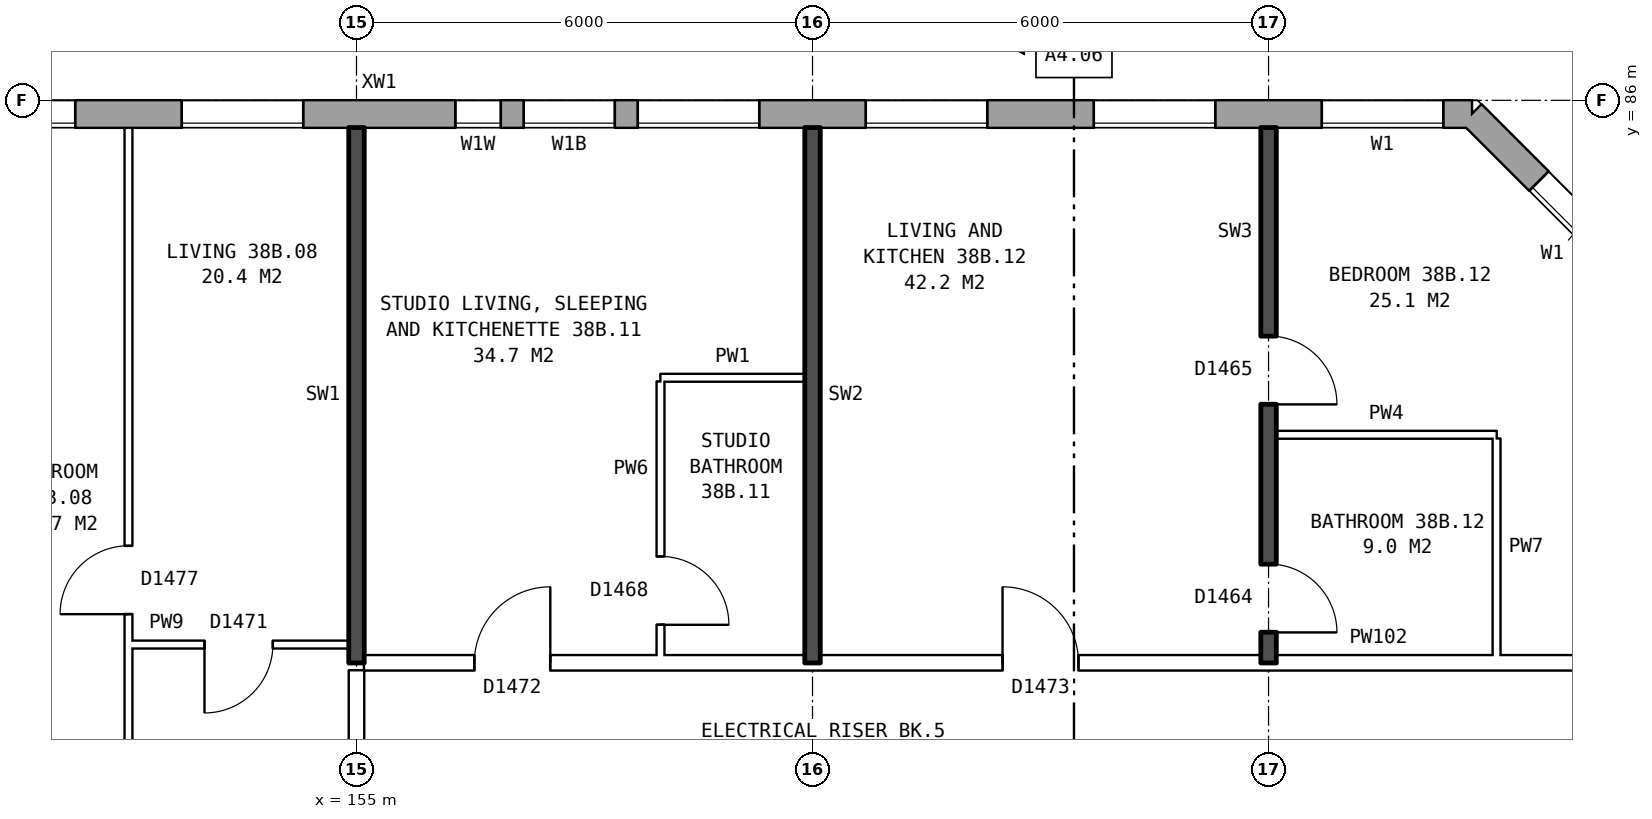
"""IFC4 building model, lengths in metres.
Left out: names, types, materials, properties, quantities, classifications, styles, units other than length and angle.
Written with IfcOpenShell. Run it as: python <this file> out.ifc"""

import sys

from ifc_helpers import new_model, si_unit, direction, frame, frame_2d, origin, place, context, subcontext, project, spatial, rectangle, extrude, element, fill, save


model = new_model("IFC4")
c1 = context("Model", 3, precision=1e-05, world=origin(), true_north=direction((0.0, 1.0)))
c2 = subcontext(c1, "Body", "Model", "MODEL_VIEW")
j1 = project(units=[si_unit("LENGTHUNIT", "METRE"), si_unit("PLANEANGLEUNIT", "RADIAN")], contexts=[c1])
p1 = place(None, origin())
s1 = spatial("IfcSite", under=j1, at=p1, CompositionType="ELEMENT")
p2 = place(p1, origin())
s2 = spatial("IfcBuilding", under=s1, at=p2, CompositionType="ELEMENT")
p3 = place(p2, frame((0.0, 0.0, 136.1)))
s3 = spatial("IfcBuildingStorey", under=s2, at=p3, CompositionType="ELEMENT", Elevation=136.1)
p4 = place(p3, frame((172.57, 82.925, 0.0), z_axis=(0.0, 0.0, 1.0), x_axis=(-0.707106781187, 0.707106781187, 0.0)))
e1 = element("IfcWall", 1, at=p4, inside=s3, PredefinedType="STANDARD", context=c2, shape_type="SweptSolid", body=[
    extrude(rectangle(XDim=4.094, YDim=0.36, at=frame_2d((2.047, 0.0))), origin(), (0.0, 0.0, 1.0), 2.85),
])
p5 = place(p4, frame((1.247, 0.0, 0.8)))
e2 = element("IfcOpeningElement", 2, at=p5, cuts=e1, PredefinedType="OPENING", context=c2, shape_type="SweptSolid", body=[
    extrude(rectangle(XDim=1.6, YDim=1.8, at=frame_2d((0.8, 0.9))), frame((0.0, 0.19, 0.0), z_axis=(0.0, -1.0, 0.0), x_axis=(1.0, 0.0, 0.0)), (0.0, 0.0, 1.0), 0.38),
])
p6 = place(p3, frame((169.675, 85.82, 0.0), z_axis=(0.0, 0.0, 1.0), x_axis=(-1.0, 0.0, 0.0)))
e3 = element("IfcWall", 3, at=p6, inside=s3, PredefinedType="STANDARD", context=c2, shape_type="SweptSolid", body=[
    extrude(rectangle(XDim=35.601, YDim=0.36, at=frame_2d((17.8, 0.0))), origin(), (0.0, 0.0, 1.0), 2.85),
])
p7 = place(p6, frame((0.375, 0.0, 0.8)))
e4 = element("IfcOpeningElement", 4, at=p7, cuts=e3, PredefinedType="OPENING", context=c2, shape_type="SweptSolid", body=[
    extrude(rectangle(XDim=1.6, YDim=1.8, at=frame_2d((0.8, 0.9))), frame((0.0, 0.19, 0.0), z_axis=(0.0, -1.0, 0.0), x_axis=(1.0, 0.0, 0.0)), (0.0, 0.0, 1.0), 0.38),
])
p8 = place(p6, frame((3.375, 0.0, 0.8)))
e5 = element("IfcOpeningElement", 5, at=p8, cuts=e3, PredefinedType="OPENING", context=c2, shape_type="SweptSolid", body=[
    extrude(rectangle(XDim=1.6, YDim=1.8, at=frame_2d((0.8, 0.9))), frame((0.0, 0.19, 0.0), z_axis=(0.0, -1.0, 0.0), x_axis=(1.0, 0.0, 0.0)), (0.0, 0.0, 1.0), 0.38),
])
p9 = place(p6, frame((6.375, 0.0, 0.8)))
e6 = element("IfcOpeningElement", 6, at=p9, cuts=e3, PredefinedType="OPENING", context=c2, shape_type="SweptSolid", body=[
    extrude(rectangle(XDim=1.6, YDim=1.8, at=frame_2d((0.8, 0.9))), frame((0.0, 0.19, 0.0), z_axis=(0.0, -1.0, 0.0), x_axis=(1.0, 0.0, 0.0)), (0.0, 0.0, 1.0), 0.38),
])
p10 = place(p6, frame((9.375, 0.0, 0.8)))
e7 = element("IfcOpeningElement", 7, at=p10, cuts=e3, PredefinedType="OPENING", context=c2, shape_type="SweptSolid", body=[
    extrude(rectangle(XDim=1.6, YDim=1.8, at=frame_2d((0.8, 0.9))), frame((0.0, 0.19, 0.0), z_axis=(0.0, -1.0, 0.0), x_axis=(1.0, 0.0, 0.0)), (0.0, 0.0, 1.0), 0.38),
])
p11 = place(p6, frame((11.275, 0.0, 0.8)))
e8 = element("IfcOpeningElement", 8, at=p11, cuts=e3, PredefinedType="OPENING", context=c2, shape_type="SweptSolid", body=[
    extrude(rectangle(XDim=1.2, YDim=1.8, at=frame_2d((0.6, 0.9))), frame((0.0, 0.19, 0.0), z_axis=(0.0, -1.0, 0.0), x_axis=(1.0, 0.0, 0.0)), (0.0, 0.0, 1.0), 0.38),
])
p12 = place(p6, frame((15.375, 0.0, 0.8)))
e9 = element("IfcOpeningElement", 9, at=p12, cuts=e3, PredefinedType="OPENING", context=c2, shape_type="SweptSolid", body=[
    extrude(rectangle(XDim=1.6, YDim=1.8, at=frame_2d((0.8, 0.9))), frame((0.0, 0.19, 0.0), z_axis=(0.0, -1.0, 0.0), x_axis=(1.0, 0.0, 0.0)), (0.0, 0.0, 1.0), 0.38),
])
p13 = place(p6, frame((18.375, 0.0, 0.8)))
e10 = element("IfcOpeningElement", 10, at=p13, cuts=e3, PredefinedType="OPENING", context=c2, shape_type="SweptSolid", body=[
    extrude(rectangle(XDim=1.6, YDim=1.8, at=frame_2d((0.8, 0.9))), frame((0.0, 0.19, 0.0), z_axis=(0.0, -1.0, 0.0), x_axis=(1.0, 0.0, 0.0)), (0.0, 0.0, 1.0), 0.38),
])
p14 = place(p6, frame((20.875, 0.0, 0.35)))
e11 = element("IfcOpeningElement", 11, at=p14, cuts=e3, PredefinedType="OPENING", context=c2, shape_type="SweptSolid", body=[
    extrude(rectangle(XDim=0.6, YDim=0.9, at=frame_2d((0.3, 0.45))), frame((0.0, 0.19, 0.0), z_axis=(0.0, -1.0, 0.0), x_axis=(1.0, 0.0, 0.0)), (0.0, 0.0, 1.0), 0.38),
])
p15 = place(p6, frame((24.375, 0.0, 0.8)))
e12 = element("IfcOpeningElement", 12, at=p15, cuts=e3, PredefinedType="OPENING", context=c2, shape_type="SweptSolid", body=[
    extrude(rectangle(XDim=1.6, YDim=1.8, at=frame_2d((0.8, 0.9))), frame((0.0, 0.19, 0.0), z_axis=(0.0, -1.0, 0.0), x_axis=(1.0, 0.0, 0.0)), (0.0, 0.0, 1.0), 0.38),
])
p16 = place(p6, frame((27.375, 0.0, 0.8)))
e13 = element("IfcOpeningElement", 13, at=p16, cuts=e3, PredefinedType="OPENING", context=c2, shape_type="SweptSolid", body=[
    extrude(rectangle(XDim=1.6, YDim=1.8, at=frame_2d((0.8, 0.9))), frame((0.0, 0.19, 0.0), z_axis=(0.0, -1.0, 0.0), x_axis=(1.0, 0.0, 0.0)), (0.0, 0.0, 1.0), 0.38),
])
p17 = place(p6, frame((30.375, 0.0, 0.8)))
e14 = element("IfcOpeningElement", 14, at=p17, cuts=e3, PredefinedType="OPENING", context=c2, shape_type="SweptSolid", body=[
    extrude(rectangle(XDim=1.6, YDim=1.8, at=frame_2d((0.8, 0.9))), frame((0.0, 0.19, 0.0), z_axis=(0.0, -1.0, 0.0), x_axis=(1.0, 0.0, 0.0)), (0.0, 0.0, 1.0), 0.38),
])
p18 = place(p6, frame((33.375, 0.0, 0.8)))
e15 = element("IfcOpeningElement", 15, at=p18, cuts=e3, PredefinedType="OPENING", context=c2, shape_type="SweptSolid", body=[
    extrude(rectangle(XDim=1.6, YDim=1.8, at=frame_2d((0.8, 0.9))), frame((0.0, 0.19, 0.0), z_axis=(0.0, -1.0, 0.0), x_axis=(1.0, 0.0, 0.0)), (0.0, 0.0, 1.0), 0.38),
])
p19 = place(p6, frame((12.775, 0.0, 1.6)))
e16 = element("IfcOpeningElement", 16, at=p19, cuts=e3, PredefinedType="OPENING", context=c2, shape_type="SweptSolid", body=[
    extrude(rectangle(XDim=0.6, YDim=0.9, at=frame_2d((0.3, 0.45))), frame((0.0, 0.19, 0.0), z_axis=(0.0, -1.0, 0.0), x_axis=(1.0, 0.0, 0.0)), (0.0, 0.0, 1.0), 0.38),
])
p20 = place(p6, frame((22.425, 0.0, 1.35)))
e17 = element("IfcOpeningElement", 17, at=p20, cuts=e3, PredefinedType="OPENING", context=c2, shape_type="SweptSolid", body=[
    extrude(rectangle(XDim=1.0, YDim=1.2, at=frame_2d((0.5, 0.6))), frame((0.0, 0.19, 0.0), z_axis=(0.0, -1.0, 0.0), x_axis=(1.0, 0.0, 0.0)), (0.0, 0.0, 1.0), 0.38),
])
p21 = place(p3, frame((155.1, 78.6, 0.0), z_axis=(0.0, 0.0, 1.0), x_axis=(1.0, 0.0, 0.0)))
e18 = element("IfcWall", 18, at=p21, inside=s3, PredefinedType="PARTITIONING", context=c2, shape_type="SweptSolid", body=[
    extrude(rectangle(XDim=17.29, YDim=0.2, at=frame_2d((8.645, 0.0))), origin(), (0.0, 0.0, 1.0), 2.85),
])
p22 = place(p21, frame((1.45, 0.0, 0.0)))
e19 = element("IfcOpeningElement", 19, at=p22, cuts=e18, PredefinedType="OPENING", context=c2, shape_type="SweptSolid", body=[
    extrude(rectangle(XDim=1.0, YDim=2.1, at=frame_2d((0.5, 1.05))), frame((0.0, 0.11, 0.0), z_axis=(0.0, -1.0, 0.0), x_axis=(1.0, 0.0, 0.0)), (0.0, 0.0, 1.0), 0.22),
])
p23 = place(p21, frame((8.4, 0.0, 0.0)))
e20 = element("IfcOpeningElement", 20, at=p23, cuts=e18, PredefinedType="OPENING", context=c2, shape_type="SweptSolid", body=[
    extrude(rectangle(XDim=1.0, YDim=2.1, at=frame_2d((0.5, 1.05))), frame((0.0, 0.11, 0.0), z_axis=(0.0, -1.0, 0.0), x_axis=(1.0, 0.0, 0.0)), (0.0, 0.0, 1.0), 0.22),
])
p24 = place(p3, frame((152.0, 78.84, 0.0), z_axis=(0.0, 0.0, 1.0), x_axis=(1.0, 0.0, 0.0)))
e21 = element("IfcWall", 21, at=p24, inside=s3, PredefinedType="PARTITIONING", context=c2, shape_type="SweptSolid", body=[
    extrude(rectangle(XDim=2.9, YDim=0.1, at=frame_2d((1.45, 0.0))), origin(), (0.0, 0.0, 1.0), 2.85),
])
p25 = place(p24, frame((1.0, 0.0, 0.0)))
e22 = element("IfcOpeningElement", 22, at=p25, cuts=e21, PredefinedType="OPENING", context=c2, shape_type="SweptSolid", body=[
    extrude(rectangle(XDim=0.9, YDim=2.1, at=frame_2d((0.45, 1.05))), frame((0.0, 0.06, 0.0), z_axis=(0.0, -1.0, 0.0), x_axis=(1.0, 0.0, 0.0)), (0.0, 0.0, 1.0), 0.12),
])
p26 = place(p3, frame((167.1, 81.6, 0.0), z_axis=(0.0, 0.0, 1.0), x_axis=(1.0, 0.0, 0.0)))
e23 = element("IfcWall", 23, at=p26, inside=s3, PredefinedType="PARTITIONING", context=c2, shape_type="SweptSolid", body=[
    extrude(rectangle(XDim=2.9, YDim=0.1, at=frame_2d((1.45, 0.0))), origin(), (0.0, 0.0, 1.0), 2.85),
])
p27 = place(p3, frame((159.0, 82.35, 0.0), z_axis=(0.0, 0.0, 1.0), x_axis=(1.0, 0.0, 0.0)))
e24 = element("IfcWall", 24, at=p27, inside=s3, PredefinedType="PARTITIONING", context=c2, shape_type="SweptSolid", body=[
    extrude(rectangle(XDim=1.9, YDim=0.1, at=frame_2d((0.95, 0.0))), origin(), (0.0, 0.0, 1.0), 2.85),
])
p28 = place(p3, frame((152.0, 71.3, 0.0), z_axis=(0.0, 0.0, 1.0), x_axis=(0.0, 1.0, 0.0)))
e25 = element("IfcWall", 25, at=p28, inside=s3, PredefinedType="PARTITIONING", context=c2, shape_type="SweptSolid", body=[
    extrude(rectangle(XDim=14.34, YDim=0.1, at=frame_2d((7.17, 0.0))), origin(), (0.0, 0.0, 1.0), 2.85),
])
p29 = place(p28, frame((7.94, 0.0, 0.0)))
e26 = element("IfcOpeningElement", 26, at=p29, cuts=e25, PredefinedType="OPENING", context=c2, shape_type="SweptSolid", body=[
    extrude(rectangle(XDim=0.9, YDim=2.1, at=frame_2d((0.45, 1.05))), frame((0.0, 0.06, 0.0), z_axis=(0.0, -1.0, 0.0), x_axis=(1.0, 0.0, 0.0)), (0.0, 0.0, 1.0), 0.12),
])
p30 = place(p28, frame((0.4, 0.0, 0.0)))
e27 = element("IfcOpeningElement", 27, at=p30, cuts=e25, PredefinedType="OPENING", context=c2, shape_type="SweptSolid", body=[
    extrude(rectangle(XDim=0.9, YDim=2.1, at=frame_2d((0.45, 1.05))), frame((0.0, 0.06, 0.0), z_axis=(0.0, -1.0, 0.0), x_axis=(1.0, 0.0, 0.0)), (0.0, 0.0, 1.0), 0.12),
])
p31 = place(p3, frame((155.0, 76.3, 0.0), z_axis=(0.0, 0.0, 1.0), x_axis=(0.0, 1.0, 0.0)))
e28 = element("IfcWall", 28, at=p31, inside=s3, PredefinedType="PARTITIONING", context=c2, shape_type="SweptSolid", body=[
    extrude(rectangle(XDim=2.2, YDim=0.2, at=frame_2d((1.1, 0.0))), origin(), (0.0, 0.0, 1.0), 2.85),
])
p32 = place(p3, frame((155.0, 78.6, 0.0), z_axis=(0.0, 0.0, 1.0), x_axis=(0.0, 1.0, 0.0)))
e29 = element("IfcWall", 29, at=p32, inside=s3, PredefinedType="SOLIDWALL", context=c2, shape_type="SweptSolid", body=[
    extrude(rectangle(XDim=7.04, YDim=0.2, at=frame_2d((3.52, 0.0))), origin(), (0.0, 0.0, 1.0), 2.85),
])
p33 = place(p3, frame((159.0, 78.7, 0.0), z_axis=(0.0, 0.0, 1.0), x_axis=(0.0, 1.0, 0.0)))
e30 = element("IfcWall", 30, at=p33, inside=s3, PredefinedType="PARTITIONING", context=c2, shape_type="SweptSolid", body=[
    extrude(rectangle(XDim=3.6, YDim=0.1, at=frame_2d((1.8, 0.0))), origin(), (0.0, 0.0, 1.0), 2.85),
])
p34 = place(p33, frame((0.4, 0.0, 0.0)))
e31 = element("IfcOpeningElement", 31, at=p34, cuts=e30, PredefinedType="OPENING", context=c2, shape_type="SweptSolid", body=[
    extrude(rectangle(XDim=0.9, YDim=2.1, at=frame_2d((0.45, 1.05))), frame((0.0, 0.06, 0.0), z_axis=(0.0, -1.0, 0.0), x_axis=(1.0, 0.0, 0.0)), (0.0, 0.0, 1.0), 0.12),
])
p35 = place(p3, frame((161.0, 78.6, 0.0), z_axis=(0.0, 0.0, 1.0), x_axis=(0.0, 1.0, 0.0)))
e32 = element("IfcWall", 32, at=p35, inside=s3, PredefinedType="SOLIDWALL", context=c2, shape_type="SweptSolid", body=[
    extrude(rectangle(XDim=7.04, YDim=0.2, at=frame_2d((3.52, 0.0))), origin(), (0.0, 0.0, 1.0), 2.85),
])
p36 = place(p3, frame((167.0, 78.6, 0.0), z_axis=(0.0, 0.0, 1.0), x_axis=(0.0, 1.0, 0.0)))
e33 = element("IfcWall", 33, at=p36, inside=s3, PredefinedType="SOLIDWALL", context=c2, shape_type="SweptSolid", body=[
    extrude(rectangle(XDim=7.04, YDim=0.2, at=frame_2d((3.52, 0.0))), origin(), (0.0, 0.0, 1.0), 2.85),
])
p37 = place(p36, frame((3.4, 0.0, 0.0)))
e34 = element("IfcOpeningElement", 34, at=p37, cuts=e33, PredefinedType="OPENING", context=c2, shape_type="SweptSolid", body=[
    extrude(rectangle(XDim=0.9, YDim=2.1, at=frame_2d((0.45, 1.05))), frame((0.0, 0.11, 0.0), z_axis=(0.0, -1.0, 0.0), x_axis=(1.0, 0.0, 0.0)), (0.0, 0.0, 1.0), 0.22),
])
p38 = place(p36, frame((0.4, 0.0, 0.0)))
e35 = element("IfcOpeningElement", 35, at=p38, cuts=e33, PredefinedType="OPENING", context=c2, shape_type="SweptSolid", body=[
    extrude(rectangle(XDim=0.9, YDim=2.1, at=frame_2d((0.45, 1.05))), frame((0.0, 0.11, 0.0), z_axis=(0.0, -1.0, 0.0), x_axis=(1.0, 0.0, 0.0)), (0.0, 0.0, 1.0), 0.22),
])
p39 = place(p3, frame((170.0, 78.7, 0.0), z_axis=(0.0, 0.0, 1.0), x_axis=(0.0, 1.0, 0.0)))
e36 = element("IfcWall", 36, at=p39, inside=s3, PredefinedType="PARTITIONING", context=c2, shape_type="SweptSolid", body=[
    extrude(rectangle(XDim=2.85, YDim=0.1, at=frame_2d((1.425, 0.0))), origin(), (0.0, 0.0, 1.0), 2.85),
])
p40 = place(p5, origin())
e37 = element("IfcWindow", 37, at=p40, inside=s3, PartitioningType="SINGLE_PANEL", PredefinedType="WINDOW", context=c2, shape_type="SweptSolid", body=[
    extrude(rectangle(XDim=1.6, YDim=1.8, at=frame_2d((0.8, 0.9))), frame((0.0, 0.15, 0.0), z_axis=(0.0, -1.0, 0.0), x_axis=(1.0, 0.0, 0.0)), (0.0, 0.0, 1.0), 0.06),
])
fill(e2, e37)
p41 = place(p7, origin())
e38 = element("IfcWindow", 38, at=p41, inside=s3, PartitioningType="SINGLE_PANEL", PredefinedType="WINDOW", context=c2, shape_type="SweptSolid", body=[
    extrude(rectangle(XDim=1.6, YDim=1.8, at=frame_2d((0.8, 0.9))), frame((0.0, 0.15, 0.0), z_axis=(0.0, -1.0, 0.0), x_axis=(1.0, 0.0, 0.0)), (0.0, 0.0, 1.0), 0.06),
])
fill(e4, e38)
p42 = place(p8, origin())
e39 = element("IfcWindow", 39, at=p42, inside=s3, PartitioningType="SINGLE_PANEL", PredefinedType="WINDOW", context=c2, shape_type="SweptSolid", body=[
    extrude(rectangle(XDim=1.6, YDim=1.8, at=frame_2d((0.8, 0.9))), frame((0.0, 0.15, 0.0), z_axis=(0.0, -1.0, 0.0), x_axis=(1.0, 0.0, 0.0)), (0.0, 0.0, 1.0), 0.06),
])
fill(e5, e39)
p43 = place(p9, origin())
e40 = element("IfcWindow", 40, at=p43, inside=s3, PartitioningType="SINGLE_PANEL", PredefinedType="WINDOW", context=c2, shape_type="SweptSolid", body=[
    extrude(rectangle(XDim=1.6, YDim=1.8, at=frame_2d((0.8, 0.9))), frame((0.0, 0.15, 0.0), z_axis=(0.0, -1.0, 0.0), x_axis=(1.0, 0.0, 0.0)), (0.0, 0.0, 1.0), 0.06),
])
fill(e6, e40)
p44 = place(p10, origin())
e41 = element("IfcWindow", 41, at=p44, inside=s3, PartitioningType="SINGLE_PANEL", PredefinedType="WINDOW", context=c2, shape_type="SweptSolid", body=[
    extrude(rectangle(XDim=1.6, YDim=1.8, at=frame_2d((0.8, 0.9))), frame((0.0, 0.15, 0.0), z_axis=(0.0, -1.0, 0.0), x_axis=(1.0, 0.0, 0.0)), (0.0, 0.0, 1.0), 0.06),
])
fill(e7, e41)
p45 = place(p11, origin())
e42 = element("IfcWindow", 42, at=p45, inside=s3, PartitioningType="SINGLE_PANEL", PredefinedType="WINDOW", context=c2, shape_type="SweptSolid", body=[
    extrude(rectangle(XDim=1.2, YDim=1.8, at=frame_2d((0.6, 0.9))), frame((0.0, 0.15, 0.0), z_axis=(0.0, -1.0, 0.0), x_axis=(1.0, 0.0, 0.0)), (0.0, 0.0, 1.0), 0.06),
])
fill(e8, e42)
p46 = place(p12, origin())
e43 = element("IfcWindow", 43, at=p46, inside=s3, PartitioningType="SINGLE_PANEL", PredefinedType="WINDOW", context=c2, shape_type="SweptSolid", body=[
    extrude(rectangle(XDim=1.6, YDim=1.8, at=frame_2d((0.8, 0.9))), frame((0.0, 0.15, 0.0), z_axis=(0.0, -1.0, 0.0), x_axis=(1.0, 0.0, 0.0)), (0.0, 0.0, 1.0), 0.06),
])
fill(e9, e43)
p47 = place(p13, origin())
e44 = element("IfcWindow", 44, at=p47, inside=s3, PartitioningType="SINGLE_PANEL", PredefinedType="WINDOW", context=c2, shape_type="SweptSolid", body=[
    extrude(rectangle(XDim=1.6, YDim=1.8, at=frame_2d((0.8, 0.9))), frame((0.0, 0.15, 0.0), z_axis=(0.0, -1.0, 0.0), x_axis=(1.0, 0.0, 0.0)), (0.0, 0.0, 1.0), 0.06),
])
fill(e10, e44)
p48 = place(p29, origin())
e45 = element("IfcDoor", 45, at=p48, inside=s3, OperationType="SINGLE_SWING_LEFT", PredefinedType="DOOR", context=c2, shape_type="SweptSolid", body=[
    extrude(rectangle(XDim=0.9, YDim=2.1, at=frame_2d((0.45, 1.05))), frame((0.0, 0.025, 0.0), z_axis=(0.0, -1.0, 0.0), x_axis=(1.0, 0.0, 0.0)), (0.0, 0.0, 1.0), 0.05),
])
fill(e26, e45)
p49 = place(p25, frame((0.9, 0.0, 0.0), z_axis=(0.0, 0.0, 1.0), x_axis=(-1.0, 0.0, 0.0)))
e46 = element("IfcDoor", 46, at=p49, inside=s3, OperationType="SINGLE_SWING_RIGHT", PredefinedType="DOOR", context=c2, shape_type="SweptSolid", body=[
    extrude(rectangle(XDim=0.9, YDim=2.1, at=frame_2d((0.45, 1.05))), frame((0.0, 0.025, 0.0), z_axis=(0.0, -1.0, 0.0), x_axis=(1.0, 0.0, 0.0)), (0.0, 0.0, 1.0), 0.05),
])
fill(e22, e46)
p50 = place(p22, origin())
e47 = element("IfcDoor", 47, at=p50, inside=s3, OperationType="SINGLE_SWING_RIGHT", PredefinedType="DOOR", context=c2, shape_type="SweptSolid", body=[
    extrude(rectangle(XDim=1.0, YDim=2.1, at=frame_2d((0.5, 1.05))), frame((0.0, 0.025, 0.0), z_axis=(0.0, -1.0, 0.0), x_axis=(1.0, 0.0, 0.0)), (0.0, 0.0, 1.0), 0.05),
])
fill(e19, e47)
p51 = place(p34, frame((0.9, 0.0, 0.0), z_axis=(0.0, 0.0, 1.0), x_axis=(-1.0, 0.0, 0.0)))
e48 = element("IfcDoor", 48, at=p51, inside=s3, OperationType="SINGLE_SWING_RIGHT", PredefinedType="DOOR", context=c2, shape_type="SweptSolid", body=[
    extrude(rectangle(XDim=0.9, YDim=2.1, at=frame_2d((0.45, 1.05))), frame((0.0, 0.025, 0.0), z_axis=(0.0, -1.0, 0.0), x_axis=(1.0, 0.0, 0.0)), (0.0, 0.0, 1.0), 0.05),
])
fill(e31, e48)
p52 = place(p37, frame((0.9, 0.0, 0.0), z_axis=(0.0, 0.0, 1.0), x_axis=(-1.0, 0.0, 0.0)))
e49 = element("IfcDoor", 49, at=p52, inside=s3, OperationType="SINGLE_SWING_RIGHT", PredefinedType="DOOR", context=c2, shape_type="SweptSolid", body=[
    extrude(rectangle(XDim=0.9, YDim=2.1, at=frame_2d((0.45, 1.05))), frame((0.0, 0.025, 0.0), z_axis=(0.0, -1.0, 0.0), x_axis=(1.0, 0.0, 0.0)), (0.0, 0.0, 1.0), 0.05),
])
fill(e34, e49)
p53 = place(p23, origin())
e50 = element("IfcDoor", 50, at=p53, inside=s3, OperationType="SINGLE_SWING_LEFT", PredefinedType="DOOR", context=c2, shape_type="SweptSolid", body=[
    extrude(rectangle(XDim=1.0, YDim=2.1, at=frame_2d((0.5, 1.05))), frame((0.0, 0.025, 0.0), z_axis=(0.0, -1.0, 0.0), x_axis=(1.0, 0.0, 0.0)), (0.0, 0.0, 1.0), 0.05),
])
fill(e20, e50)
p54 = place(p38, frame((0.9, 0.0, 0.0), z_axis=(0.0, 0.0, 1.0), x_axis=(-1.0, 0.0, 0.0)))
e51 = element("IfcDoor", 51, at=p54, inside=s3, OperationType="SINGLE_SWING_RIGHT", PredefinedType="DOOR", context=c2, shape_type="SweptSolid", body=[
    extrude(rectangle(XDim=0.9, YDim=2.1, at=frame_2d((0.45, 1.05))), frame((0.0, 0.025, 0.0), z_axis=(0.0, -1.0, 0.0), x_axis=(1.0, 0.0, 0.0)), (0.0, 0.0, 1.0), 0.05),
])
fill(e35, e51)
p55 = place(p19, origin())
e52 = element("IfcWindow", 52, at=p55, inside=s3, PartitioningType="SINGLE_PANEL", PredefinedType="WINDOW", context=c2, shape_type="SweptSolid", body=[
    extrude(rectangle(XDim=0.6, YDim=0.9, at=frame_2d((0.3, 0.45))), frame((0.0, 0.15, 0.0), z_axis=(0.0, -1.0, 0.0), x_axis=(1.0, 0.0, 0.0)), (0.0, 0.0, 1.0), 0.06),
])
fill(e16, e52)
save(model, sys.argv[1])
